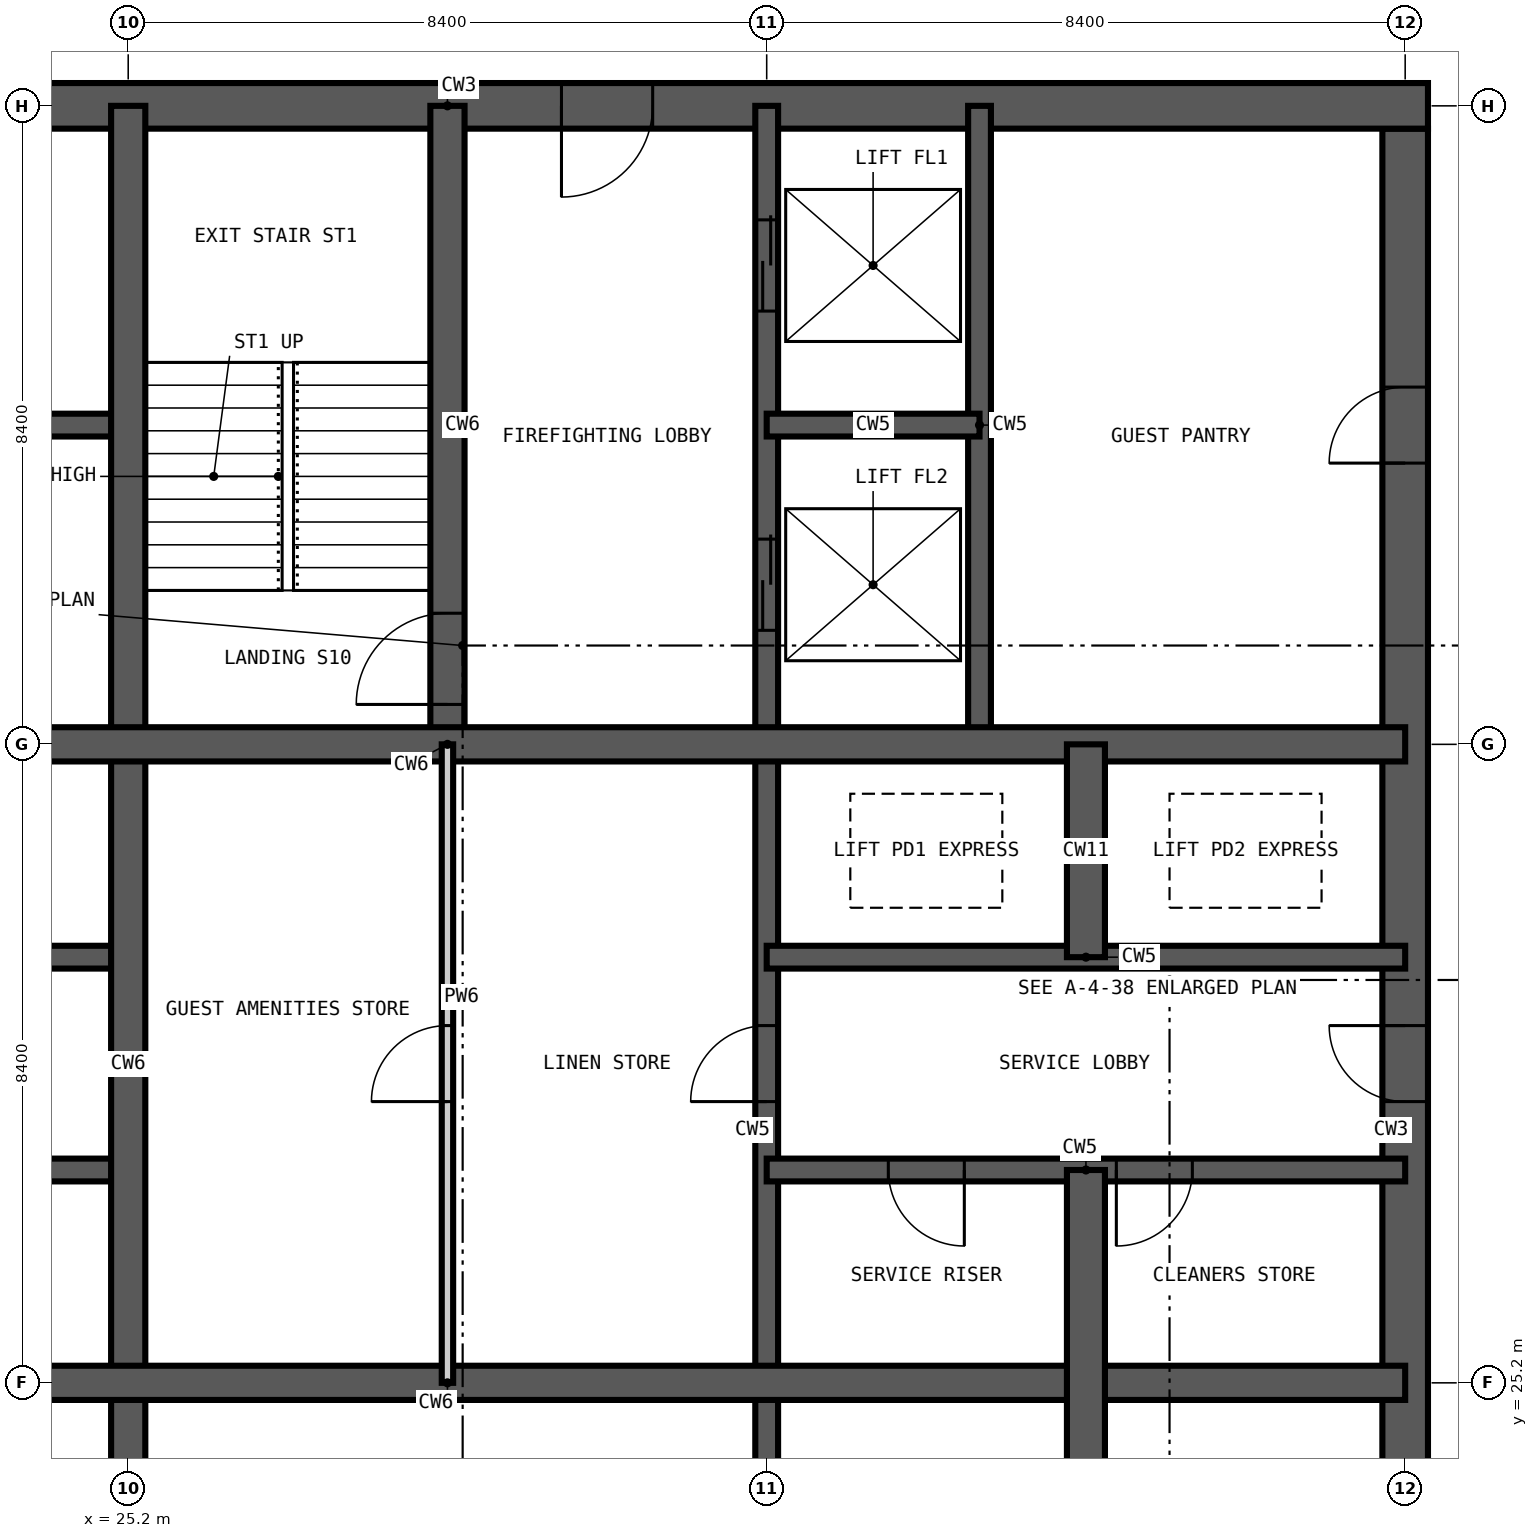
"""IFC4 building model, lengths in metres.
Left out: names, types, materials, properties, quantities, classifications, styles, units other than length and angle.
Written with IfcOpenShell. Run it as: python <this file> out.ifc"""

import sys

from ifc_helpers import new_model, si_unit, direction, frame, frame_2d, origin, place, context, subcontext, project, spatial, rectangle, extrude, element, fill, save


model = new_model("IFC4")
c1 = context("Model", 3, precision=1e-05, world=origin(), true_north=direction((0.0, 1.0)))
c2 = subcontext(c1, "Body", "Model", "MODEL_VIEW")
j1 = project(units=[si_unit("LENGTHUNIT", "METRE"), si_unit("PLANEANGLEUNIT", "RADIAN")], contexts=[c1])
p1 = place(None, origin())
s1 = spatial("IfcSite", under=j1, at=p1, CompositionType="ELEMENT")
p2 = place(p1, origin())
s2 = spatial("IfcBuilding", under=s1, at=p2, CompositionType="ELEMENT")
p3 = place(p2, frame((0.0, 0.0, 187.8)))
s3 = spatial("IfcBuildingStorey", under=s2, at=p3, CompositionType="ELEMENT", Elevation=187.8)
p4 = place(p3, frame((42.0, 17.1, -0.35), z_axis=(0.0, 0.0, 1.0), x_axis=(0.0, 1.0, 0.0)))
e1 = element("IfcWall", 1, at=p4, inside=s3, PredefinedType="SHEAR", context=c2, shape_type="SweptSolid", body=[
    extrude(rectangle(XDim=24.6, YDim=0.6, at=frame_2d((12.3, 0.0))), origin(), (0.0, 0.0, 1.0), 3.6),
])
p5 = place(p4, frame((0.5, 0.0, 0.35)))
e2 = element("IfcOpeningElement", 2, at=p5, cuts=e1, PredefinedType="OPENING", context=c2, shape_type="SweptSolid", body=[
    extrude(rectangle(XDim=1.2, YDim=2.2, at=frame_2d((0.6, 1.1))), frame((0.0, 0.31, 0.0), z_axis=(0.0, -1.0, 0.0), x_axis=(1.0, 0.0, 0.0)), (0.0, 0.0, 1.0), 0.62),
])
p6 = place(p4, frame((11.8, 0.0, 0.35)))
e3 = element("IfcOpeningElement", 3, at=p6, cuts=e1, PredefinedType="OPENING", context=c2, shape_type="SweptSolid", body=[
    extrude(rectangle(XDim=1.0, YDim=2.1, at=frame_2d((0.5, 1.05))), frame((0.0, 0.31, 0.0), z_axis=(0.0, -1.0, 0.0), x_axis=(1.0, 0.0, 0.0)), (0.0, 0.0, 1.0), 0.62),
])
p7 = place(p4, frame((20.2, 0.0, 0.35)))
e4 = element("IfcOpeningElement", 4, at=p7, cuts=e1, PredefinedType="OPENING", context=c2, shape_type="SweptSolid", body=[
    extrude(rectangle(XDim=1.0, YDim=2.1, at=frame_2d((0.5, 1.05))), frame((0.0, 0.31, 0.0), z_axis=(0.0, -1.0, 0.0), x_axis=(1.0, 0.0, 0.0)), (0.0, 0.0, 1.0), 0.62),
])
p8 = place(p3, frame((42.3, 42.0, -0.35), z_axis=(0.0, 0.0, 1.0), x_axis=(-1.0, 0.0, 0.0)))
e5 = element("IfcWall", 5, at=p8, inside=s3, PredefinedType="SHEAR", context=c2, shape_type="SweptSolid", body=[
    extrude(rectangle(XDim=25.8, YDim=0.6, at=frame_2d((12.9, 0.0))), origin(), (0.0, 0.0, 1.0), 3.6),
])
p9 = place(p8, frame((20.8, 0.0, 0.35)))
e6 = element("IfcOpeningElement", 6, at=p9, cuts=e5, PredefinedType="OPENING", context=c2, shape_type="SweptSolid", body=[
    extrude(rectangle(XDim=1.0, YDim=2.1, at=frame_2d((0.5, 1.05))), frame((0.0, 0.31, 0.0), z_axis=(0.0, -1.0, 0.0), x_axis=(1.0, 0.0, 0.0)), (0.0, 0.0, 1.0), 0.62),
])
p10 = place(p8, frame((10.2, 0.0, 0.35)))
e7 = element("IfcOpeningElement", 7, at=p10, cuts=e5, PredefinedType="OPENING", context=c2, shape_type="SweptSolid", body=[
    extrude(rectangle(XDim=1.2, YDim=2.2, at=frame_2d((0.6, 1.1))), frame((0.0, 0.31, 0.0), z_axis=(0.0, -1.0, 0.0), x_axis=(1.0, 0.0, 0.0)), (0.0, 0.0, 1.0), 0.62),
])
p11 = place(p3, frame((33.6, 16.8, -0.35), z_axis=(0.0, 0.0, 1.0), x_axis=(0.0, 1.0, 0.0)))
e8 = element("IfcWall", 8, at=p11, inside=s3, PredefinedType="SHEAR", context=c2, shape_type="SweptSolid", body=[
    extrude(rectangle(XDim=25.2, YDim=0.3, at=frame_2d((12.6, 0.0))), origin(), (0.0, 0.0, 1.0), 3.6),
])
p12 = place(p11, frame((22.5, 0.0, 0.35)))
e9 = element("IfcOpeningElement", 9, at=p12, cuts=e8, PredefinedType="OPENING", context=c2, shape_type="SweptSolid", body=[
    extrude(rectangle(XDim=1.2, YDim=2.2, at=frame_2d((0.6, 1.1))), frame((0.0, 0.16, 0.0), z_axis=(0.0, -1.0, 0.0), x_axis=(1.0, 0.0, 0.0)), (0.0, 0.0, 1.0), 0.32),
])
p13 = place(p11, frame((18.3, 0.0, 0.35)))
e10 = element("IfcOpeningElement", 10, at=p13, cuts=e8, PredefinedType="OPENING", context=c2, shape_type="SweptSolid", body=[
    extrude(rectangle(XDim=1.2, YDim=2.2, at=frame_2d((0.6, 1.1))), frame((0.0, 0.16, 0.0), z_axis=(0.0, -1.0, 0.0), x_axis=(1.0, 0.0, 0.0)), (0.0, 0.0, 1.0), 0.32),
])
p14 = place(p11, frame((12.1, 0.0, 0.35)))
e11 = element("IfcOpeningElement", 11, at=p14, cuts=e8, PredefinedType="OPENING", context=c2, shape_type="SweptSolid", body=[
    extrude(rectangle(XDim=1.0, YDim=2.1, at=frame_2d((0.5, 1.05))), frame((0.0, 0.16, 0.0), z_axis=(0.0, -1.0, 0.0), x_axis=(1.0, 0.0, 0.0)), (0.0, 0.0, 1.0), 0.32),
])
p15 = place(p3, frame((36.4, 33.6, -0.35), z_axis=(0.0, 0.0, 1.0), x_axis=(0.0, 1.0, 0.0)))
e12 = element("IfcWall", 12, at=p15, inside=s3, PredefinedType="SHEAR", context=c2, shape_type="SweptSolid", body=[
    extrude(rectangle(XDim=8.4, YDim=0.3, at=frame_2d((4.2, 0.0))), origin(), (0.0, 0.0, 1.0), 3.6),
])
p16 = place(p3, frame((16.8, 28.0, -0.35), z_axis=(0.0, 0.0, 1.0), x_axis=(1.0, 0.0, 0.0)))
e13 = element("IfcWall", 13, at=p16, inside=s3, PredefinedType="SHEAR", context=c2, shape_type="SweptSolid", body=[
    extrude(rectangle(XDim=8.4, YDim=0.3, at=frame_2d((4.2, 0.0))), origin(), (0.0, 0.0, 1.0), 3.6),
])
p17 = place(p16, frame((1.55, 0.0, 0.35)))
e14 = element("IfcOpeningElement", 14, at=p17, cuts=e13, PredefinedType="OPENING", context=c2, shape_type="SweptSolid", body=[
    extrude(rectangle(XDim=1.1, YDim=2.2, at=frame_2d((0.55, 1.1))), frame((0.0, 0.16, 0.0), z_axis=(0.0, -1.0, 0.0), x_axis=(1.0, 0.0, 0.0)), (0.0, 0.0, 1.0), 0.32),
])
p18 = place(p16, frame((5.75, 0.0, 0.35)))
e15 = element("IfcOpeningElement", 15, at=p18, cuts=e13, PredefinedType="OPENING", context=c2, shape_type="SweptSolid", body=[
    extrude(rectangle(XDim=1.1, YDim=2.2, at=frame_2d((0.55, 1.1))), frame((0.0, 0.16, 0.0), z_axis=(0.0, -1.0, 0.0), x_axis=(1.0, 0.0, 0.0)), (0.0, 0.0, 1.0), 0.32),
])
p19 = place(p3, frame((33.6, 28.0, -0.35), z_axis=(0.0, 0.0, 1.0), x_axis=(1.0, 0.0, 0.0)))
e16 = element("IfcWall", 16, at=p19, inside=s3, PredefinedType="SHEAR", context=c2, shape_type="SweptSolid", body=[
    extrude(rectangle(XDim=8.4, YDim=0.3, at=frame_2d((4.2, 0.0))), origin(), (0.0, 0.0, 1.0), 3.6),
])
p20 = place(p19, frame((1.6, 0.0, 0.35)))
e17 = element("IfcOpeningElement", 17, at=p20, cuts=e16, PredefinedType="OPENING", context=c2, shape_type="SweptSolid", body=[
    extrude(rectangle(XDim=1.0, YDim=2.1, at=frame_2d((0.5, 1.05))), frame((0.0, 0.16, 0.0), z_axis=(0.0, -1.0, 0.0), x_axis=(1.0, 0.0, 0.0)), (0.0, 0.0, 1.0), 0.32),
])
p21 = place(p19, frame((4.6, 0.0, 0.35)))
e18 = element("IfcOpeningElement", 18, at=p21, cuts=e16, PredefinedType="OPENING", context=c2, shape_type="SweptSolid", body=[
    extrude(rectangle(XDim=1.0, YDim=2.1, at=frame_2d((0.5, 1.05))), frame((0.0, 0.16, 0.0), z_axis=(0.0, -1.0, 0.0), x_axis=(1.0, 0.0, 0.0)), (0.0, 0.0, 1.0), 0.32),
])
p22 = place(p3, frame((16.8, 30.8, -0.35), z_axis=(0.0, 0.0, 1.0), x_axis=(1.0, 0.0, 0.0)))
e19 = element("IfcWall", 19, at=p22, inside=s3, PredefinedType="SHEAR", context=c2, shape_type="SweptSolid", body=[
    extrude(rectangle(XDim=8.4, YDim=0.3, at=frame_2d((4.2, 0.0))), origin(), (0.0, 0.0, 1.0), 3.6),
])
p23 = place(p22, frame((1.55, 0.0, 0.35)))
e20 = element("IfcOpeningElement", 20, at=p23, cuts=e19, PredefinedType="OPENING", context=c2, shape_type="SweptSolid", body=[
    extrude(rectangle(XDim=1.1, YDim=2.2, at=frame_2d((0.55, 1.1))), frame((0.0, 0.16, 0.0), z_axis=(0.0, -1.0, 0.0), x_axis=(1.0, 0.0, 0.0)), (0.0, 0.0, 1.0), 0.32),
])
p24 = place(p22, frame((5.75, 0.0, 0.35)))
e21 = element("IfcOpeningElement", 21, at=p24, cuts=e19, PredefinedType="OPENING", context=c2, shape_type="SweptSolid", body=[
    extrude(rectangle(XDim=1.1, YDim=2.2, at=frame_2d((0.55, 1.1))), frame((0.0, 0.16, 0.0), z_axis=(0.0, -1.0, 0.0), x_axis=(1.0, 0.0, 0.0)), (0.0, 0.0, 1.0), 0.32),
])
for number, where, z_axis, x_axis in (
    (22, (33.6, 30.8, -0.35), (0.0, 0.0, 1.0), (1.0, 0.0, 0.0)),
    (23, (16.8, 37.8, -0.35), (0.0, 0.0, 1.0), (1.0, 0.0, 0.0)),
):
    element("IfcWall", number, at=place(p3, frame(where, z_axis=z_axis, x_axis=x_axis)), inside=s3, PredefinedType="SHEAR", context=c2, shape_type="SweptSolid", body=[
        extrude(rectangle(XDim=8.4, YDim=0.3, at=frame_2d((4.2, 0.0))), origin(), (0.0, 0.0, 1.0), 3.6),
    ])
p25 = place(p3, frame((33.6, 37.8, -0.35), z_axis=(0.0, 0.0, 1.0), x_axis=(1.0, 0.0, 0.0)))
e24 = element("IfcWall", 24, at=p25, inside=s3, PredefinedType="SHEAR", context=c2, shape_type="SweptSolid", body=[
    extrude(rectangle(XDim=2.8, YDim=0.3, at=frame_2d((1.4, 0.0))), origin(), (0.0, 0.0, 1.0), 3.6),
])
p26 = place(p3, frame((25.2, 16.8, -0.35), z_axis=(0.0, 0.0, 1.0), x_axis=(0.0, 1.0, 0.0)))
e25 = element("IfcWall", 25, at=p26, inside=s3, PredefinedType="SHEAR", context=c2, shape_type="SweptSolid", body=[
    extrude(rectangle(XDim=25.2, YDim=0.45, at=frame_2d((12.6, 0.0))), origin(), (0.0, 0.0, 1.0), 3.6),
])
p27 = place(p3, frame((29.4, 33.6, -0.35), z_axis=(0.0, 0.0, 1.0), x_axis=(0.0, 1.0, 0.0)))
e26 = element("IfcWall", 26, at=p27, inside=s3, PredefinedType="SHEAR", context=c2, shape_type="SweptSolid", body=[
    extrude(rectangle(XDim=8.4, YDim=0.45, at=frame_2d((4.2, 0.0))), origin(), (0.0, 0.0, 1.0), 3.6),
])
p28 = place(p27, frame((0.525, 0.0, 0.35)))
e27 = element("IfcOpeningElement", 27, at=p28, cuts=e26, PredefinedType="OPENING", context=c2, shape_type="SweptSolid", body=[
    extrude(rectangle(XDim=1.2, YDim=2.2, at=frame_2d((0.6, 1.1))), frame((0.0, 0.235, 0.0), z_axis=(0.0, -1.0, 0.0), x_axis=(1.0, 0.0, 0.0)), (0.0, 0.0, 1.0), 0.47),
])
for number, where, z_axis, x_axis in (
    (28, (16.8, 25.2, -0.35), (0.0, 0.0, 1.0), (1.0, 0.0, 0.0)),
    (29, (16.8, 33.6, -0.35), (0.0, 0.0, 1.0), (1.0, 0.0, 0.0)),
):
    element("IfcWall", number, at=place(p3, frame(where, z_axis=z_axis, x_axis=x_axis)), inside=s3, PredefinedType="SHEAR", context=c2, shape_type="SweptSolid", body=[
        extrude(rectangle(XDim=25.2, YDim=0.45, at=frame_2d((12.6, 0.0))), origin(), (0.0, 0.0, 1.0), 3.6),
    ])
p29 = place(p3, frame((37.8, 16.8, -0.35), z_axis=(0.0, 0.0, 1.0), x_axis=(0.0, 1.0, 0.0)))
e30 = element("IfcWall", 30, at=p29, inside=s3, PredefinedType="SHEAR", context=c2, shape_type="SweptSolid", body=[
    extrude(rectangle(XDim=11.2, YDim=0.5, at=frame_2d((5.6, 0.0))), origin(), (0.0, 0.0, 1.0), 3.6),
])
p30 = place(p3, frame((37.8, 30.8, -0.35), z_axis=(0.0, 0.0, 1.0), x_axis=(0.0, 1.0, 0.0)))
e31 = element("IfcWall", 31, at=p30, inside=s3, PredefinedType="SHEAR", context=c2, shape_type="SweptSolid", body=[
    extrude(rectangle(XDim=2.8, YDim=0.5, at=frame_2d((1.4, 0.0))), origin(), (0.0, 0.0, 1.0), 3.6),
])
p31 = place(p3, frame((29.4, 25.2, 0.0), z_axis=(0.0, 0.0, 1.0), x_axis=(0.0, 1.0, 0.0)))
e32 = element("IfcWall", 32, at=p31, inside=s3, PredefinedType="PARTITIONING", context=c2, shape_type="SweptSolid", body=[
    extrude(rectangle(XDim=8.4, YDim=0.15, at=frame_2d((4.2, 0.0))), origin(), (0.0, 0.0, 1.0), 3.25),
])
p32 = place(p31, frame((3.7, 0.0, 0.0)))
e33 = element("IfcOpeningElement", 33, at=p32, cuts=e32, PredefinedType="OPENING", context=c2, shape_type="SweptSolid", body=[
    extrude(rectangle(XDim=1.0, YDim=2.1, at=frame_2d((0.5, 1.05))), frame((0.0, 0.085, 0.0), z_axis=(0.0, -1.0, 0.0), x_axis=(1.0, 0.0, 0.0)), (0.0, 0.0, 1.0), 0.17),
])
p33 = place(p28, origin())
e34 = element("IfcDoor", 34, at=p33, inside=s3, OperationType="SINGLE_SWING_LEFT", PredefinedType="DOOR", context=c2, shape_type="SweptSolid", body=[
    extrude(rectangle(XDim=1.2, YDim=2.2, at=frame_2d((0.6, 1.1))), frame((0.0, 0.025, 0.0), z_axis=(0.0, -1.0, 0.0), x_axis=(1.0, 0.0, 0.0)), (0.0, 0.0, 1.0), 0.05),
])
fill(e27, e34)
p34 = place(p12, origin())
e35 = element("IfcDoor", 35, at=p34, inside=s3, OperationType="DOUBLE_DOOR_SLIDING", PredefinedType="DOOR", context=c2, shape_type="SweptSolid", body=[
    extrude(rectangle(XDim=1.2, YDim=2.2, at=frame_2d((0.6, 1.1))), frame((0.0, 0.025, 0.0), z_axis=(0.0, -1.0, 0.0), x_axis=(1.0, 0.0, 0.0)), (0.0, 0.0, 1.0), 0.05),
])
fill(e9, e35)
p35 = place(p13, origin())
e36 = element("IfcDoor", 36, at=p35, inside=s3, OperationType="DOUBLE_DOOR_SLIDING", PredefinedType="DOOR", context=c2, shape_type="SweptSolid", body=[
    extrude(rectangle(XDim=1.2, YDim=2.2, at=frame_2d((0.6, 1.1))), frame((0.0, 0.025, 0.0), z_axis=(0.0, -1.0, 0.0), x_axis=(1.0, 0.0, 0.0)), (0.0, 0.0, 1.0), 0.05),
])
fill(e10, e36)
p36 = place(p14, origin())
e37 = element("IfcDoor", 37, at=p36, inside=s3, OperationType="SINGLE_SWING_LEFT", PredefinedType="DOOR", context=c2, shape_type="SweptSolid", body=[
    extrude(rectangle(XDim=1.0, YDim=2.1, at=frame_2d((0.5, 1.05))), frame((0.0, 0.025, 0.0), z_axis=(0.0, -1.0, 0.0), x_axis=(1.0, 0.0, 0.0)), (0.0, 0.0, 1.0), 0.05),
])
fill(e11, e37)
p37 = place(p32, origin())
e38 = element("IfcDoor", 38, at=p37, inside=s3, OperationType="SINGLE_SWING_LEFT", PredefinedType="DOOR", context=c2, shape_type="SweptSolid", body=[
    extrude(rectangle(XDim=1.0, YDim=2.1, at=frame_2d((0.5, 1.05))), frame((0.0, 0.025, 0.0), z_axis=(0.0, -1.0, 0.0), x_axis=(1.0, 0.0, 0.0)), (0.0, 0.0, 1.0), 0.05),
])
fill(e33, e38)
p38 = place(p20, frame((1.0, 0.0, 0.0), z_axis=(0.0, 0.0, 1.0), x_axis=(-1.0, 0.0, 0.0)))
e39 = element("IfcDoor", 39, at=p38, inside=s3, OperationType="SINGLE_SWING_LEFT", PredefinedType="DOOR", context=c2, shape_type="SweptSolid", body=[
    extrude(rectangle(XDim=1.0, YDim=2.1, at=frame_2d((0.5, 1.05))), frame((0.0, 0.025, 0.0), z_axis=(0.0, -1.0, 0.0), x_axis=(1.0, 0.0, 0.0)), (0.0, 0.0, 1.0), 0.05),
])
fill(e17, e39)
p39 = place(p21, frame((1.0, 0.0, 0.0), z_axis=(0.0, 0.0, 1.0), x_axis=(-1.0, 0.0, 0.0)))
e40 = element("IfcDoor", 40, at=p39, inside=s3, OperationType="SINGLE_SWING_RIGHT", PredefinedType="DOOR", context=c2, shape_type="SweptSolid", body=[
    extrude(rectangle(XDim=1.0, YDim=2.1, at=frame_2d((0.5, 1.05))), frame((0.0, 0.025, 0.0), z_axis=(0.0, -1.0, 0.0), x_axis=(1.0, 0.0, 0.0)), (0.0, 0.0, 1.0), 0.05),
])
fill(e18, e40)
p40 = place(p6, origin())
e41 = element("IfcDoor", 41, at=p40, inside=s3, OperationType="SINGLE_SWING_RIGHT", PredefinedType="DOOR", context=c2, shape_type="SweptSolid", body=[
    extrude(rectangle(XDim=1.0, YDim=2.1, at=frame_2d((0.5, 1.05))), frame((0.0, 0.025, 0.0), z_axis=(0.0, -1.0, 0.0), x_axis=(1.0, 0.0, 0.0)), (0.0, 0.0, 1.0), 0.05),
])
fill(e3, e41)
p41 = place(p10, origin())
e42 = element("IfcDoor", 42, at=p41, inside=s3, OperationType="SINGLE_SWING_RIGHT", PredefinedType="DOOR", context=c2, shape_type="SweptSolid", body=[
    extrude(rectangle(XDim=1.2, YDim=2.2, at=frame_2d((0.6, 1.1))), frame((0.0, 0.025, 0.0), z_axis=(0.0, -1.0, 0.0), x_axis=(1.0, 0.0, 0.0)), (0.0, 0.0, 1.0), 0.05),
])
fill(e7, e42)
p42 = place(p7, origin())
e43 = element("IfcDoor", 43, at=p42, inside=s3, OperationType="SINGLE_SWING_LEFT", PredefinedType="DOOR", context=c2, shape_type="SweptSolid", body=[
    extrude(rectangle(XDim=1.0, YDim=2.1, at=frame_2d((0.5, 1.05))), frame((0.0, 0.025, 0.0), z_axis=(0.0, -1.0, 0.0), x_axis=(1.0, 0.0, 0.0)), (0.0, 0.0, 1.0), 0.05),
])
fill(e4, e43)
save(model, sys.argv[1])
